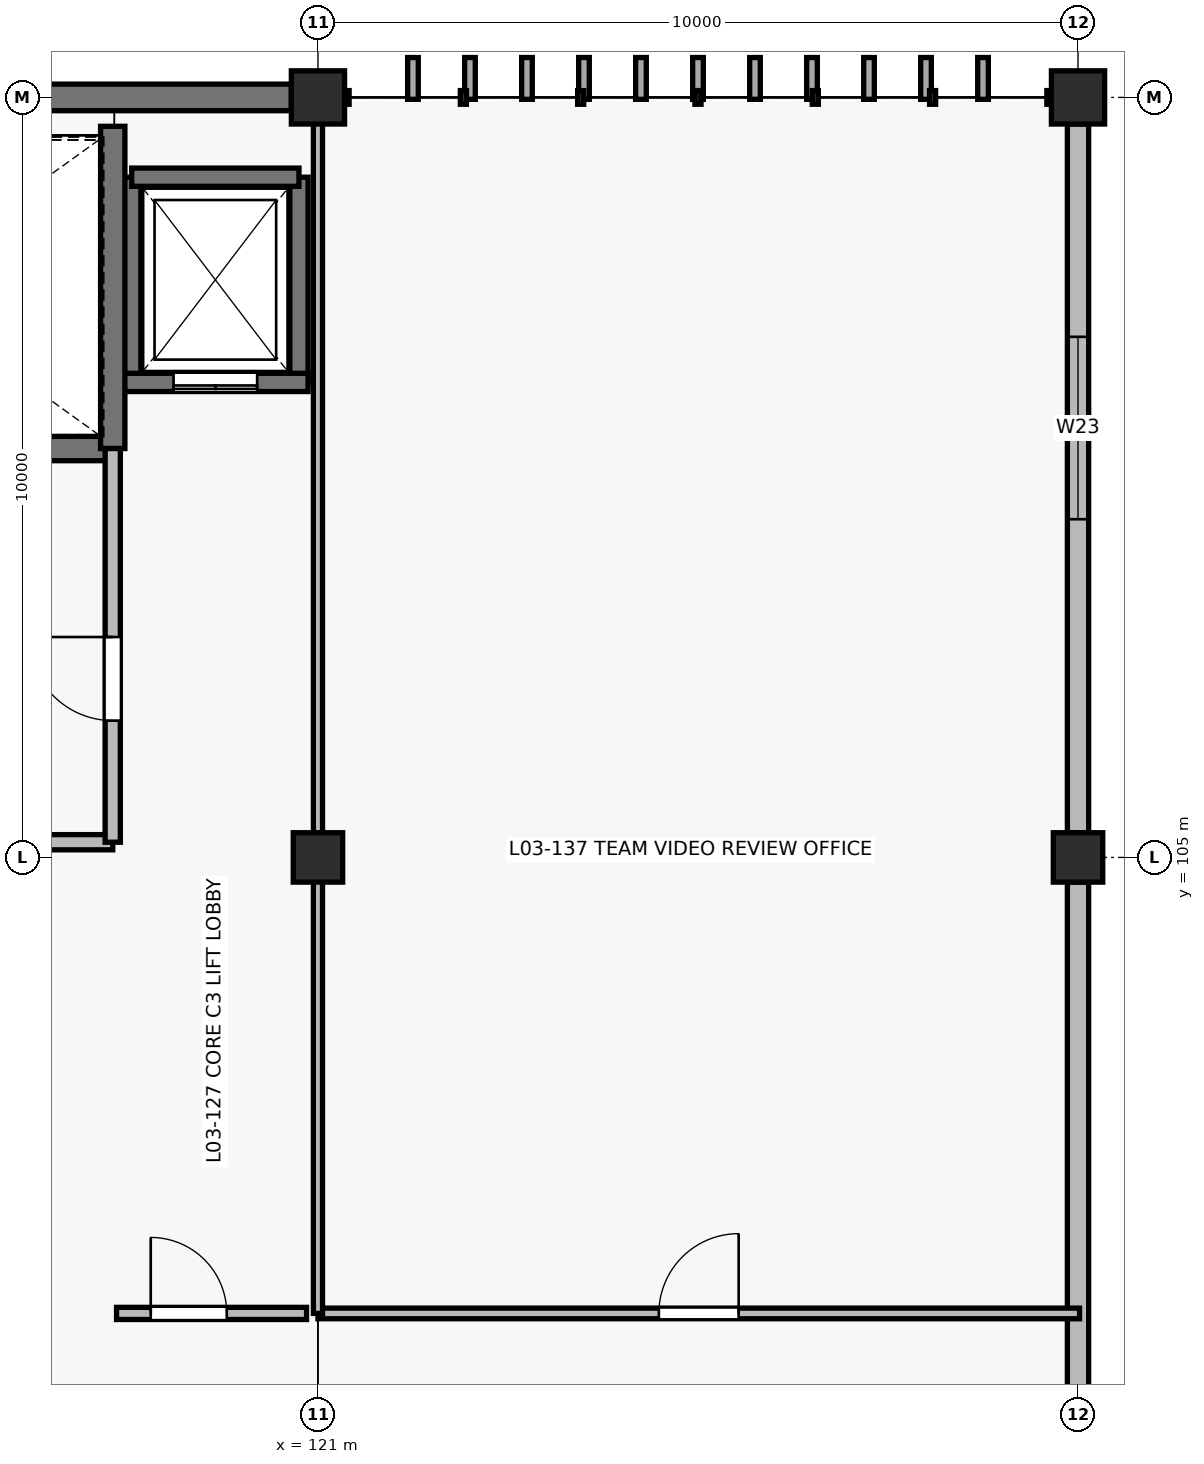
"""IFC4 building model, lengths in metres.
Left out: names, types, materials, properties, quantities, classifications, styles, units other than length and angle.
Written with IfcOpenShell. Run it as: python <this file> out.ifc"""

import sys

from ifc_helpers import new_model, si_unit, direction, frame, frame_2d, origin, origin_2d, place, context, subcontext, project, spatial, rectangle, circle, extrude, element, fill, save


model = new_model("IFC4")
c1 = context("Model", 3, precision=1e-05, world=origin(), true_north=direction((0.0, 1.0)))
c2 = subcontext(c1, "Body", "Model", "MODEL_VIEW")
j1 = project(units=[si_unit("LENGTHUNIT", "METRE"), si_unit("PLANEANGLEUNIT", "RADIAN")], contexts=[c1])
p1 = place(None, origin())
s1 = spatial("IfcSite", under=j1, at=p1, CompositionType="ELEMENT")
p2 = place(p1, origin())
s2 = spatial("IfcBuilding", under=s1, at=p2, CompositionType="ELEMENT")
p3 = place(p2, frame((0.0, 0.0, 13.2)))
s3 = spatial("IfcBuildingStorey", under=s2, at=p3, CompositionType="ELEMENT", Elevation=13.2)
p4 = place(p3, frame((121.0, 105.0, 0.0), z_axis=(0.0, 0.0, 1.0), x_axis=(1.0, 0.0, 0.0)))
e1 = element("IfcColumn", 1, at=p4, inside=s3, PredefinedType="COLUMN", context=c2, shape_type="SweptSolid", body=[
    extrude(rectangle(XDim=0.65, YDim=0.65, at=origin_2d()), origin(), (0.0, 0.0, 1.0), 4.2),
])
p5 = place(p3, frame((121.0, 115.0, 0.0), z_axis=(0.0, 0.0, 1.0), x_axis=(1.0, 0.0, 0.0)))
e2 = element("IfcColumn", 2, at=p5, inside=s3, PredefinedType="COLUMN", context=c2, shape_type="SweptSolid", body=[
    extrude(circle(Radius=0.35, at=origin_2d()), origin(), (0.0, 0.0, 1.0), 4.2),
])
p6 = place(p3, frame((131.0, 105.0, 0.0), z_axis=(0.0, 0.0, 1.0), x_axis=(1.0, 0.0, 0.0)))
e3 = element("IfcColumn", 3, at=p6, inside=s3, PredefinedType="COLUMN", context=c2, shape_type="SweptSolid", body=[
    extrude(rectangle(XDim=0.65, YDim=0.65, at=origin_2d()), origin(), (0.0, 0.0, 1.0), 4.2),
])
p7 = place(p3, frame((131.0, 115.0, 0.0), z_axis=(0.0, 0.0, 1.0), x_axis=(1.0, 0.0, 0.0)))
e4 = element("IfcColumn", 4, at=p7, inside=s3, PredefinedType="COLUMN", context=c2, shape_type="SweptSolid", body=[
    extrude(circle(Radius=0.35, at=origin_2d()), origin(), (0.0, 0.0, 1.0), 4.2),
])
p8 = place(p3, frame((111.35, 115.0, 0.0), z_axis=(0.0, 0.0, 1.0), x_axis=(1.0, 0.0, 0.0)))
e5 = element("IfcWall", 5, at=p8, inside=s3, PredefinedType="SOLIDWALL", context=c2, shape_type="SweptSolid", body=[
    extrude(rectangle(XDim=9.3, YDim=0.35, at=frame_2d((4.65, 0.0))), origin(), (0.0, 0.0, 1.0), 4.2),
])
p9 = place(p8, frame((2.2, 0.0, 1.0)))
e6 = element("IfcOpeningElement", 6, at=p9, cuts=e5, PredefinedType="OPENING", context=c2, shape_type="SweptSolid", body=[
    extrude(rectangle(XDim=1.2, YDim=1.8, at=frame_2d((0.6, 0.9))), frame((0.0, 0.185, 0.0), z_axis=(0.0, -1.0, 0.0), x_axis=(1.0, 0.0, 0.0)), (0.0, 0.0, 1.0), 0.37),
])
p10 = place(p3, frame((131.0, 104.675, 0.0), z_axis=(0.0, 0.0, 1.0), x_axis=(0.0, -1.0, 0.0)))
e7 = element("IfcWall", 7, at=p10, inside=s3, PredefinedType="SOLIDWALL", context=c2, shape_type="SweptSolid", body=[
    extrude(rectangle(XDim=9.525, YDim=0.28, at=frame_2d((4.763, 0.0))), origin(), (0.0, 0.0, 1.0), 0.475),
])
p11 = place(p3, frame((131.0, 114.65, 0.0), z_axis=(0.0, 0.0, 1.0), x_axis=(0.0, -1.0, 0.0)))
e8 = element("IfcWall", 8, at=p11, inside=s3, PredefinedType="SOLIDWALL", context=c2, shape_type="SweptSolid", body=[
    extrude(rectangle(XDim=9.325, YDim=0.28, at=frame_2d((4.663, 0.0))), origin(), (0.0, 0.0, 1.0), 3.005),
])
p12 = place(p11, frame((2.8, 0.0, 0.9)))
e9 = element("IfcOpeningElement", 9, at=p12, cuts=e8, PredefinedType="OPENING", context=c2, shape_type="SweptSolid", body=[
    extrude(rectangle(XDim=2.4, YDim=1.1, at=frame_2d((1.2, 0.55))), frame((0.0, 0.15, 0.0), z_axis=(0.0, -1.0, 0.0), x_axis=(1.0, 0.0, 0.0)), (0.0, 0.0, 1.0), 0.3),
])
for number, where, z_axis, x_axis in (
    (10, (118.55, 111.25, 0.0), (0.0, 0.0, 1.0), (0.0, 1.0, 0.0)),
    (11, (120.75, 113.95, 0.0), (0.0, 0.0, 1.0), (0.0, -1.0, 0.0)),
):
    element("IfcWall", number, at=place(p3, frame(where, z_axis=z_axis, x_axis=x_axis)), inside=s3, PredefinedType="SHEAR", context=c2, shape_type="SweptSolid", body=[
        extrude(rectangle(XDim=2.7, YDim=0.24, at=frame_2d((1.35, 0.0))), origin(), (0.0, 0.0, 1.0), 4.2),
    ])
p13 = place(p3, frame((118.55, 113.95, 0.0), z_axis=(0.0, 0.0, 1.0), x_axis=(1.0, 0.0, 0.0)))
e12 = element("IfcWall", 12, at=p13, inside=s3, PredefinedType="SHEAR", context=c2, shape_type="SweptSolid", body=[
    extrude(rectangle(XDim=2.2, YDim=0.24, at=frame_2d((1.1, 0.0))), origin(), (0.0, 0.0, 1.0), 4.2),
])
p14 = place(p3, frame((120.87, 111.25, 0.0), z_axis=(0.0, 0.0, 1.0), x_axis=(-1.0, 0.0, 0.0)))
e13 = element("IfcWall", 13, at=p14, inside=s3, PredefinedType="SHEAR", context=c2, shape_type="SweptSolid", body=[
    extrude(rectangle(XDim=2.44, YDim=0.24, at=frame_2d((1.22, 0.0))), origin(), (0.0, 0.0, 1.0), 4.2),
])
p15 = place(p14, frame((0.67, 0.0, 0.0)))
e14 = element("IfcOpeningElement", 14, at=p15, cuts=e13, PredefinedType="OPENING", context=c2, shape_type="SweptSolid", body=[
    extrude(rectangle(XDim=1.1, YDim=2.15, at=frame_2d((0.55, 1.075))), frame((0.0, 0.13, 0.0), z_axis=(0.0, -1.0, 0.0), x_axis=(1.0, 0.0, 0.0)), (0.0, 0.0, 1.0), 0.26),
])
p16 = place(p3, frame((111.2, 110.38, 0.0), z_axis=(0.0, 0.0, 1.0), x_axis=(1.0, 0.0, 0.0)))
e15 = element("IfcWall", 15, at=p16, inside=s3, PredefinedType="SHEAR", context=c2, shape_type="SweptSolid", body=[
    extrude(rectangle(XDim=7.1, YDim=0.32, at=frame_2d((3.55, 0.0))), origin(), (0.0, 0.0, 1.0), 4.2),
])
p17 = place(p16, frame((0.3, 0.0, 0.0)))
e16 = element("IfcOpeningElement", 16, at=p17, cuts=e15, PredefinedType="OPENING", context=c2, shape_type="SweptSolid", body=[
    extrude(rectangle(XDim=1.0, YDim=2.15, at=frame_2d((0.5, 1.075))), frame((0.0, 0.17, 0.0), z_axis=(0.0, -1.0, 0.0), x_axis=(1.0, 0.0, 0.0)), (0.0, 0.0, 1.0), 0.34),
])
p18 = place(p3, frame((118.3, 110.38, 0.0), z_axis=(0.0, 0.0, 1.0), x_axis=(0.0, 1.0, 0.0)))
e17 = element("IfcWall", 17, at=p18, inside=s3, PredefinedType="SHEAR", context=c2, shape_type="SweptSolid", body=[
    extrude(rectangle(XDim=4.24, YDim=0.32, at=frame_2d((2.12, 0.0))), origin(), (0.0, 0.0, 1.0), 4.2),
])
p19 = place(p3, frame((111.2, 105.2, 0.0), z_axis=(0.0, 0.0, 1.0), x_axis=(1.0, 0.0, 0.0)))
e18 = element("IfcWall", 18, at=p19, inside=s3, PredefinedType="PARTITIONING", context=c2, shape_type="SweptSolid", body=[
    extrude(rectangle(XDim=7.1, YDim=0.2, at=frame_2d((3.55, 0.0))), origin(), (0.0, 0.0, 1.0), 3.005),
])
p20 = place(p19, frame((2.2, 0.0, 0.0)))
e19 = element("IfcOpeningElement", 19, at=p20, cuts=e18, PredefinedType="OPENING", context=c2, shape_type="SweptSolid", body=[
    extrude(rectangle(XDim=1.6, YDim=2.2, at=frame_2d((0.8, 1.1))), frame((0.0, 0.11, 0.0), z_axis=(0.0, -1.0, 0.0), x_axis=(1.0, 0.0, 0.0)), (0.0, 0.0, 1.0), 0.22),
])
p21 = place(p3, frame((118.3, 105.2, 0.0), z_axis=(0.0, 0.0, 1.0), x_axis=(0.0, 1.0, 0.0)))
e20 = element("IfcWall", 20, at=p21, inside=s3, PredefinedType="PARTITIONING", context=c2, shape_type="SweptSolid", body=[
    extrude(rectangle(XDim=5.18, YDim=0.2, at=frame_2d((2.59, 0.0))), origin(), (0.0, 0.0, 1.0), 3.005),
])
p22 = place(p21, frame((1.6, 0.0, 0.0)))
e21 = element("IfcOpeningElement", 21, at=p22, cuts=e20, PredefinedType="OPENING", context=c2, shape_type="SweptSolid", body=[
    extrude(rectangle(XDim=1.1, YDim=2.15, at=frame_2d((0.55, 1.075))), frame((0.0, 0.11, 0.0), z_axis=(0.0, -1.0, 0.0), x_axis=(1.0, 0.0, 0.0)), (0.0, 0.0, 1.0), 0.22),
])
p23 = place(p3, frame((118.35, 99.0, 0.0), z_axis=(0.0, 0.0, 1.0), x_axis=(1.0, 0.0, 0.0)))
e22 = element("IfcWall", 22, at=p23, inside=s3, PredefinedType="PARTITIONING", context=c2, shape_type="SweptSolid", body=[
    extrude(rectangle(XDim=2.5, YDim=0.16, at=frame_2d((1.25, 0.0))), origin(), (0.0, 0.0, 1.0), 3.005),
])
p24 = place(p23, frame((0.45, 0.0, 0.0)))
e23 = element("IfcOpeningElement", 23, at=p24, cuts=e22, PredefinedType="OPENING", context=c2, shape_type="SweptSolid", body=[
    extrude(rectangle(XDim=1.0, YDim=2.15, at=frame_2d((0.5, 1.075))), frame((0.0, 0.09, 0.0), z_axis=(0.0, -1.0, 0.0), x_axis=(1.0, 0.0, 0.0)), (0.0, 0.0, 1.0), 0.18),
])
p25 = place(p3, frame((121.0, 99.0, 0.0), z_axis=(0.0, 0.0, 1.0), x_axis=(1.0, 0.0, 0.0)))
e24 = element("IfcWall", 24, at=p25, inside=s3, PredefinedType="PARTITIONING", context=c2, shape_type="SweptSolid", body=[
    extrude(rectangle(XDim=10.02, YDim=0.14, at=frame_2d((5.01, 0.0))), origin(), (0.0, 0.0, 1.0), 3.005),
])
p26 = place(p25, frame((4.485, 0.0, 0.0)))
e25 = element("IfcOpeningElement", 25, at=p26, cuts=e24, PredefinedType="OPENING", context=c2, shape_type="SweptSolid", body=[
    extrude(rectangle(XDim=1.05, YDim=2.1, at=frame_2d((0.525, 1.05))), frame((0.0, 0.08, 0.0), z_axis=(0.0, -1.0, 0.0), x_axis=(1.0, 0.0, 0.0)), (0.0, 0.0, 1.0), 0.16),
])
p27 = place(p3, frame((121.0, 99.0, 0.0), z_axis=(0.0, 0.0, 1.0), x_axis=(0.0, 1.0, 0.0)))
e26 = element("IfcWall", 26, at=p27, inside=s3, PredefinedType="PARTITIONING", context=c2, shape_type="SweptSolid", body=[
    extrude(rectangle(XDim=15.75, YDim=0.12, at=frame_2d((7.875, 0.0))), origin(), (0.0, 0.0, 1.0), 3.005),
])
p28 = place(p12, origin())
e27 = element("IfcWindow", 27, at=p28, inside=s3, PartitioningType="DOUBLE_PANEL_VERTICAL", PredefinedType="WINDOW", context=c2, shape_type="SweptSolid", body=[
    extrude(rectangle(XDim=2.4, YDim=1.1, at=frame_2d((1.2, 0.55))), frame((0.0, 0.03, 0.0), z_axis=(0.0, -1.0, 0.0), x_axis=(1.0, 0.0, 0.0)), (0.0, 0.0, 1.0), 0.06),
])
fill(e9, e27)
p29 = place(p15, origin())
e28 = element("IfcDoor", 28, at=p29, inside=s3, OperationType="DOUBLE_DOOR_SLIDING", PredefinedType="USERDEFINED", context=c2, shape_type="SweptSolid", body=[
    extrude(rectangle(XDim=1.1, YDim=2.15, at=frame_2d((0.55, 1.075))), frame((0.0, 0.025, 0.0), z_axis=(0.0, -1.0, 0.0), x_axis=(1.0, 0.0, 0.0)), (0.0, 0.0, 1.0), 0.05),
])
fill(e14, e28)
p30 = place(p22, origin())
e29 = element("IfcDoor", 29, at=p30, inside=s3, OperationType="SINGLE_SWING_RIGHT", PredefinedType="DOOR", context=c2, shape_type="SweptSolid", body=[
    extrude(rectangle(XDim=1.1, YDim=2.15, at=frame_2d((0.55, 1.075))), frame((0.0, 0.025, 0.0), z_axis=(0.0, -1.0, 0.0), x_axis=(1.0, 0.0, 0.0)), (0.0, 0.0, 1.0), 0.05),
])
fill(e21, e29)
p31 = place(p24, origin())
e30 = element("IfcDoor", 30, at=p31, inside=s3, OperationType="SINGLE_SWING_LEFT", PredefinedType="DOOR", context=c2, shape_type="SweptSolid", body=[
    extrude(rectangle(XDim=1.0, YDim=2.15, at=frame_2d((0.5, 1.075))), frame((0.0, 0.025, 0.0), z_axis=(0.0, -1.0, 0.0), x_axis=(1.0, 0.0, 0.0)), (0.0, 0.0, 1.0), 0.05),
])
fill(e23, e30)
p32 = place(p26, origin())
e31 = element("IfcDoor", 31, at=p32, inside=s3, OperationType="SINGLE_SWING_RIGHT", PredefinedType="DOOR", context=c2, shape_type="SweptSolid", body=[
    extrude(rectangle(XDim=1.05, YDim=2.1, at=frame_2d((0.525, 1.05))), frame((0.0, 0.025, 0.0), z_axis=(0.0, -1.0, 0.0), x_axis=(1.0, 0.0, 0.0)), (0.0, 0.0, 1.0), 0.05),
])
fill(e25, e31)
save(model, sys.argv[1])
